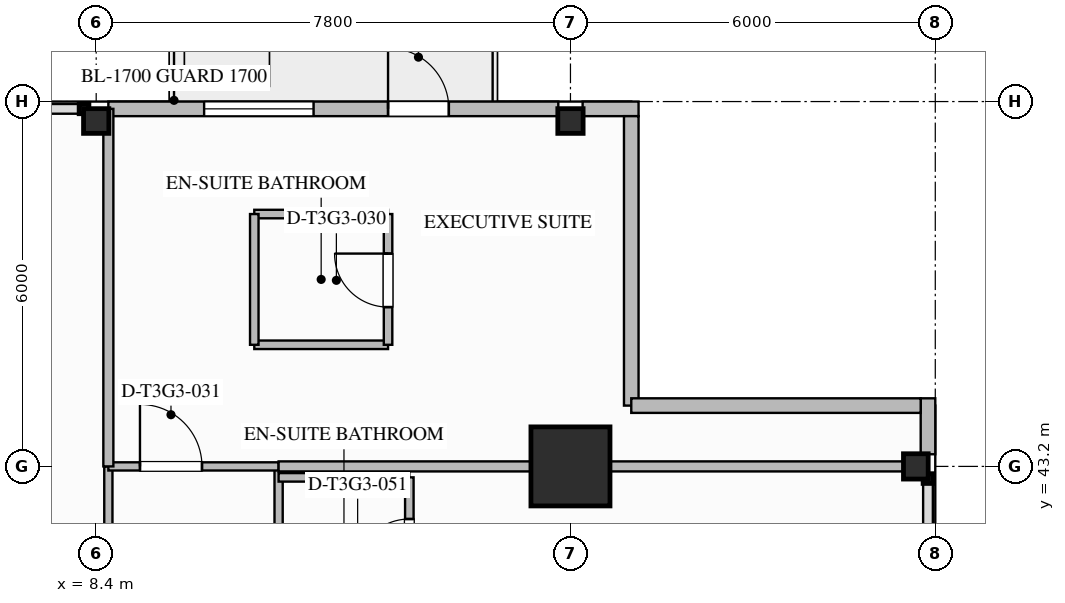
"""IFC4 building model, lengths in metres.
Left out: names, types, materials, properties, quantities, classifications, styles, units other than length and angle.
Written with IfcOpenShell. Run it as: python <this file> out.ifc"""

import sys

from ifc_helpers import new_model, si_unit, direction, frame, frame_2d, origin, origin_2d, place, context, subcontext, project, spatial, rectangle, i_section, extrude, element, fill, save


model = new_model("IFC4")
c1 = context("Model", 3, precision=1e-05, world=origin(), true_north=direction((0.0, 1.0)))
c2 = subcontext(c1, "Body", "Model", "MODEL_VIEW")
j1 = project(units=[si_unit("LENGTHUNIT", "METRE"), si_unit("PLANEANGLEUNIT", "RADIAN")], contexts=[c1])
p1 = place(None, origin())
s1 = spatial("IfcSite", under=j1, at=p1, CompositionType="ELEMENT")
p2 = place(p1, origin())
s2 = spatial("IfcBuilding", under=s1, at=p2, CompositionType="ELEMENT")
p3 = place(p2, frame((0.0, 0.0, 171.7)))
s3 = spatial("IfcBuildingStorey", under=s2, at=p3, CompositionType="ELEMENT", Elevation=171.7)
p4 = place(p3, frame((16.2, 43.2, 0.0), z_axis=(0.0, 0.0, 1.0), x_axis=(1.0, 0.0, 0.0)))
e1 = element("IfcColumn", 1, at=p4, inside=s3, PredefinedType="COLUMN", context=c2, shape_type="SweptSolid", body=[
    extrude(rectangle(XDim=1.3, YDim=1.3, at=origin_2d()), origin(), (0.0, 0.0, 1.0), 3.55),
])
for number, where, z_axis, x_axis in (
    (2, (21.88, 43.2, 0.0), (0.0, 0.0, 1.0), (1.0, 0.0, 0.0)),
    (3, (8.4, 48.88, 0.0), (0.0, 0.0, 1.0), (0.0, 1.0, 0.0)),
    (4, (16.2, 48.88, 0.0), (0.0, 0.0, 1.0), (0.0, 1.0, 0.0)),
):
    element("IfcColumn", number, at=place(p3, frame(where, z_axis=z_axis, x_axis=x_axis)), inside=s3, PredefinedType="COLUMN", context=c2, shape_type="SweptSolid", body=[
        extrude(i_section(OverallWidth=0.406, OverallDepth=0.416, WebThickness=0.03, FlangeThickness=0.048, FilletRadius=0.028, at=origin_2d()), origin(), (0.0, 0.0, 1.0), 3.547),
    ])
p5 = place(p3, frame((22.08, 44.32, 0.0), z_axis=(0.0, 0.0, 1.0), x_axis=(0.0, -1.0, 0.0)))
e5 = element("IfcWall", 5, at=p5, inside=s3, PredefinedType="STANDARD", context=c2, shape_type="SweptSolid", body=[
    extrude(rectangle(XDim=0.92, YDim=0.24, at=frame_2d((0.46, 0.0))), origin(), (0.0, 0.0, 1.0), 3.29),
])
p6 = place(p3, frame((8.6, 49.08, 0.0), z_axis=(0.0, 0.0, 1.0), x_axis=(1.0, 0.0, 0.0)))
e6 = element("IfcWall", 6, at=p6, inside=s3, PredefinedType="STANDARD", context=c2, shape_type="SweptSolid", body=[
    extrude(rectangle(XDim=7.4, YDim=0.24, at=frame_2d((3.7, 0.0))), origin(), (0.0, 0.0, 1.0), 2.753),
])
p7 = place(p6, frame((4.6, 0.0, 0.0)))
e7 = element("IfcOpeningElement", 7, at=p7, cuts=e6, PredefinedType="OPENING", context=c2, shape_type="SweptSolid", body=[
    extrude(rectangle(XDim=1.0, YDim=2.2, at=frame_2d((0.5, 1.1))), frame((0.0, 0.13, 0.0), z_axis=(0.0, -1.0, 0.0), x_axis=(1.0, 0.0, 0.0)), (0.0, 0.0, 1.0), 0.26),
])
p8 = place(p6, frame((1.575, 0.0, 0.75)))
e8 = element("IfcOpeningElement", 8, at=p8, cuts=e6, PredefinedType="OPENING", context=c2, shape_type="SweptSolid", body=[
    extrude(rectangle(XDim=1.8, YDim=1.903, at=frame_2d((0.9, 0.952))), frame((0.0, 0.13, 0.0), z_axis=(0.0, -1.0, 0.0), x_axis=(1.0, 0.0, 0.0)), (0.0, 0.0, 1.0), 0.26),
])
p9 = place(p3, frame((16.4, 49.08, 0.0), z_axis=(0.0, 0.0, 1.0), x_axis=(1.0, 0.0, 0.0)))
e9 = element("IfcWall", 9, at=p9, inside=s3, PredefinedType="STANDARD", context=c2, shape_type="SweptSolid", body=[
    extrude(rectangle(XDim=0.92, YDim=0.24, at=frame_2d((0.46, 0.0))), origin(), (0.0, 0.0, 1.0), 3.29),
])
for number, where, z_axis, x_axis in (
    (10, (17.2, 48.96, 0.0), (0.0, 0.0, 1.0), (0.0, -1.0, 0.0)),
    (11, (17.2, 44.2, 0.0), (0.0, 0.0, 1.0), (1.0, 0.0, 0.0)),
):
    element("IfcWall", number, at=place(p3, frame(where, z_axis=z_axis, x_axis=x_axis)), inside=s3, PredefinedType="STANDARD", context=c2, shape_type="SweptSolid", body=[
        extrude(rectangle(XDim=4.76, YDim=0.24, at=frame_2d((2.38, 0.0))), origin(), (0.0, 0.0, 1.0), 3.29),
    ])
p10 = place(p3, frame((8.6, 37.7, 0.0), z_axis=(0.0, 0.0, 1.0), x_axis=(0.0, 1.0, 0.0)))
e12 = element("IfcWall", 12, at=p10, inside=s3, PredefinedType="PARTITIONING", context=c2, shape_type="SweptSolid", body=[
    extrude(rectangle(XDim=5.5, YDim=0.135, at=frame_2d((2.75, 0.0))), origin(), (0.0, 0.0, 1.0), 2.667),
])
p11 = place(p3, frame((11.4, 10.8, 0.0), z_axis=(0.0, 0.0, 1.0), x_axis=(0.0, 1.0, 0.0)))
e13 = element("IfcWall", 13, at=p11, inside=s3, PredefinedType="PARTITIONING", context=c2, shape_type="SweptSolid", body=[
    extrude(rectangle(XDim=32.4, YDim=0.135, at=frame_2d((16.2, 0.0))), origin(), (0.0, 0.0, 1.0), 3.29),
])
p12 = place(p11, frame((1.005, 0.0, 0.0)))
e14 = element("IfcOpeningElement", 14, at=p12, cuts=e13, PredefinedType="OPENING", context=c2, shape_type="SweptSolid", body=[
    extrude(rectangle(XDim=0.96, YDim=2.15, at=frame_2d((0.48, 1.075))), frame((0.0, 0.077, 0.0), z_axis=(0.0, -1.0, 0.0), x_axis=(1.0, 0.0, 0.0)), (0.0, 0.0, 1.0), 0.155),
])
p13 = place(p11, frame((8.94, 0.0, 0.0)))
e15 = element("IfcOpeningElement", 15, at=p13, cuts=e13, PredefinedType="OPENING", context=c2, shape_type="SweptSolid", body=[
    extrude(rectangle(XDim=1.02, YDim=2.15, at=frame_2d((0.51, 1.075))), frame((0.0, 0.077, 0.0), z_axis=(0.0, -1.0, 0.0), x_axis=(1.0, 0.0, 0.0)), (0.0, 0.0, 1.0), 0.155),
])
p14 = place(p11, frame((14.445, 0.0, 0.0)))
e16 = element("IfcOpeningElement", 16, at=p14, cuts=e13, PredefinedType="OPENING", context=c2, shape_type="SweptSolid", body=[
    extrude(rectangle(XDim=0.96, YDim=2.15, at=frame_2d((0.48, 1.075))), frame((0.0, 0.077, 0.0), z_axis=(0.0, -1.0, 0.0), x_axis=(1.0, 0.0, 0.0)), (0.0, 0.0, 1.0), 0.155),
])
p15 = place(p11, frame((22.38, 0.0, 0.0)))
e17 = element("IfcOpeningElement", 17, at=p15, cuts=e13, PredefinedType="OPENING", context=c2, shape_type="SweptSolid", body=[
    extrude(rectangle(XDim=1.02, YDim=2.15, at=frame_2d((0.51, 1.075))), frame((0.0, 0.077, 0.0), z_axis=(0.0, -1.0, 0.0), x_axis=(1.0, 0.0, 0.0)), (0.0, 0.0, 1.0), 0.155),
])
p16 = place(p11, frame((28.005, 0.0, 0.0)))
e18 = element("IfcOpeningElement", 18, at=p16, cuts=e13, PredefinedType="OPENING", context=c2, shape_type="SweptSolid", body=[
    extrude(rectangle(XDim=0.96, YDim=2.15, at=frame_2d((0.48, 1.075))), frame((0.0, 0.077, 0.0), z_axis=(0.0, -1.0, 0.0), x_axis=(1.0, 0.0, 0.0)), (0.0, 0.0, 1.0), 0.155),
])
p17 = place(p3, frame((8.6, 43.2, 0.0), z_axis=(0.0, 0.0, 1.0), x_axis=(1.0, 0.0, 0.0)))
e19 = element("IfcWall", 19, at=p17, inside=s3, PredefinedType="PARTITIONING", context=c2, shape_type="SweptSolid", body=[
    extrude(rectangle(XDim=2.8, YDim=0.135, at=frame_2d((1.4, 0.0))), origin(), (0.0, 0.0, 1.0), 2.58),
])
p18 = place(p17, frame((0.52, 0.0, 0.0)))
e20 = element("IfcOpeningElement", 20, at=p18, cuts=e19, PredefinedType="OPENING", context=c2, shape_type="SweptSolid", body=[
    extrude(rectangle(XDim=1.02, YDim=2.15, at=frame_2d((0.51, 1.075))), frame((0.0, 0.077, 0.0), z_axis=(0.0, -1.0, 0.0), x_axis=(1.0, 0.0, 0.0)), (0.0, 0.0, 1.0), 0.155),
])
p19 = place(p3, frame((8.6, 43.2, 0.0), z_axis=(0.0, 0.0, 1.0), x_axis=(0.0, 1.0, 0.0)))
e21 = element("IfcWall", 21, at=p19, inside=s3, PredefinedType="PARTITIONING", context=c2, shape_type="SweptSolid", body=[
    extrude(rectangle(XDim=5.88, YDim=0.165, at=frame_2d((2.94, 0.0))), origin(), (0.0, 0.0, 1.0), 2.58),
])
p20 = place(p3, frame((11.4, 43.2, 0.0), z_axis=(0.0, 0.0, 1.0), x_axis=(1.0, 0.0, 0.0)))
e22 = element("IfcWall", 22, at=p20, inside=s3, PredefinedType="PARTITIONING", context=c2, shape_type="SweptSolid", body=[
    extrude(rectangle(XDim=10.68, YDim=0.165, at=frame_2d((5.34, 0.0))), origin(), (0.0, 0.0, 1.0), 2.58),
])
for number, where, z_axis, x_axis in (
    (23, (11.0, 45.2, 0.0), (0.0, 0.0, 1.0), (1.0, 0.0, 0.0)),
    (24, (11.0, 47.35, 0.0), (0.0, 0.0, 1.0), (1.0, 0.0, 0.0)),
):
    element("IfcWall", number, at=place(p3, frame(where, z_axis=z_axis, x_axis=x_axis)), inside=s3, PredefinedType="PLUMBINGWALL", context=c2, shape_type="SweptSolid", body=[
        extrude(rectangle(XDim=2.2, YDim=0.14, at=frame_2d((1.1, 0.0))), origin(), (0.0, 0.0, 1.0), 3.29),
    ])
p21 = place(p3, frame((11.0, 45.2, 0.0), z_axis=(0.0, 0.0, 1.0), x_axis=(0.0, 1.0, 0.0)))
e25 = element("IfcWall", 25, at=p21, inside=s3, PredefinedType="PLUMBINGWALL", context=c2, shape_type="SweptSolid", body=[
    extrude(rectangle(XDim=2.15, YDim=0.14, at=frame_2d((1.075, 0.0))), origin(), (0.0, 0.0, 1.0), 3.29),
])
p22 = place(p3, frame((13.2, 45.2, 0.0), z_axis=(0.0, 0.0, 1.0), x_axis=(0.0, 1.0, 0.0)))
e26 = element("IfcWall", 26, at=p22, inside=s3, PredefinedType="PLUMBINGWALL", context=c2, shape_type="SweptSolid", body=[
    extrude(rectangle(XDim=2.15, YDim=0.14, at=frame_2d((1.075, 0.0))), origin(), (0.0, 0.0, 1.0), 3.29),
])
p23 = place(p22, frame((0.62, 0.0, 0.0)))
e27 = element("IfcOpeningElement", 27, at=p23, cuts=e26, PredefinedType="OPENING", context=c2, shape_type="SweptSolid", body=[
    extrude(rectangle(XDim=0.88, YDim=2.1, at=frame_2d((0.44, 1.05))), frame((0.0, 0.08, 0.0), z_axis=(0.0, -1.0, 0.0), x_axis=(1.0, 0.0, 0.0)), (0.0, 0.0, 1.0), 0.16),
])
p24 = place(p3, frame((11.4, 43.02, 0.0), z_axis=(0.0, 0.0, 1.0), x_axis=(1.0, 0.0, 0.0)))
e28 = element("IfcWall", 28, at=p24, inside=s3, PredefinedType="PLUMBINGWALL", context=c2, shape_type="SweptSolid", body=[
    extrude(rectangle(XDim=2.15, YDim=0.14, at=frame_2d((1.075, 0.0))), origin(), (0.0, 0.0, 1.0), 2.58),
])
p25 = place(p3, frame((13.55, 40.77, 0.0), z_axis=(0.0, 0.0, 1.0), x_axis=(0.0, 1.0, 0.0)))
e29 = element("IfcWall", 29, at=p25, inside=s3, PredefinedType="PLUMBINGWALL", context=c2, shape_type="SweptSolid", body=[
    extrude(rectangle(XDim=2.25, YDim=0.14, at=frame_2d((1.125, 0.0))), origin(), (0.0, 0.0, 1.0), 3.29),
])
p26 = place(p25, frame((0.685, 0.0, 0.0)))
e30 = element("IfcOpeningElement", 30, at=p26, cuts=e29, PredefinedType="OPENING", context=c2, shape_type="SweptSolid", body=[
    extrude(rectangle(XDim=0.88, YDim=2.1, at=frame_2d((0.44, 1.05))), frame((0.0, 0.08, 0.0), z_axis=(0.0, -1.0, 0.0), x_axis=(1.0, 0.0, 0.0)), (0.0, 0.0, 1.0), 0.16),
])
p27 = place(p7, origin())
e31 = element("IfcDoor", 31, at=p27, inside=s3, OperationType="SINGLE_SWING_LEFT", PredefinedType="DOOR", context=c2, shape_type="SweptSolid", body=[
    extrude(rectangle(XDim=1.0, YDim=2.2, at=frame_2d((0.5, 1.1))), frame((0.0, 0.025, 0.0), z_axis=(0.0, -1.0, 0.0), x_axis=(1.0, 0.0, 0.0)), (0.0, 0.0, 1.0), 0.05),
])
fill(e7, e31)
p28 = place(p8, origin())
e32 = element("IfcWindow", 32, at=p28, inside=s3, PartitioningType="SINGLE_PANEL", PredefinedType="WINDOW", context=c2, shape_type="SweptSolid", body=[
    extrude(rectangle(XDim=1.8, YDim=1.903, at=frame_2d((0.9, 0.952))), frame((0.0, 0.03, 0.0), z_axis=(0.0, -1.0, 0.0), x_axis=(1.0, 0.0, 0.0)), (0.0, 0.0, 1.0), 0.06),
])
fill(e8, e32)
p29 = place(p23, origin())
e33 = element("IfcDoor", 33, at=p29, inside=s3, OperationType="SINGLE_SWING_RIGHT", PredefinedType="DOOR", context=c2, shape_type="SweptSolid", body=[
    extrude(rectangle(XDim=0.88, YDim=2.1, at=frame_2d((0.44, 1.05))), frame((0.0, 0.025, 0.0), z_axis=(0.0, -1.0, 0.0), x_axis=(1.0, 0.0, 0.0)), (0.0, 0.0, 1.0), 0.05),
])
fill(e27, e33)
p30 = place(p18, origin())
e34 = element("IfcDoor", 34, at=p30, inside=s3, OperationType="SINGLE_SWING_LEFT", PredefinedType="DOOR", context=c2, shape_type="SweptSolid", body=[
    extrude(rectangle(XDim=1.02, YDim=2.15, at=frame_2d((0.51, 1.075))), frame((0.0, 0.025, 0.0), z_axis=(0.0, -1.0, 0.0), x_axis=(1.0, 0.0, 0.0)), (0.0, 0.0, 1.0), 0.05),
])
fill(e20, e34)
p31 = place(p26, origin())
e35 = element("IfcDoor", 35, at=p31, inside=s3, OperationType="SINGLE_SWING_LEFT", PredefinedType="DOOR", context=c2, shape_type="SweptSolid", body=[
    extrude(rectangle(XDim=0.88, YDim=2.1, at=frame_2d((0.44, 1.05))), frame((0.0, 0.025, 0.0), z_axis=(0.0, -1.0, 0.0), x_axis=(1.0, 0.0, 0.0)), (0.0, 0.0, 1.0), 0.05),
])
fill(e30, e35)
save(model, sys.argv[1])
